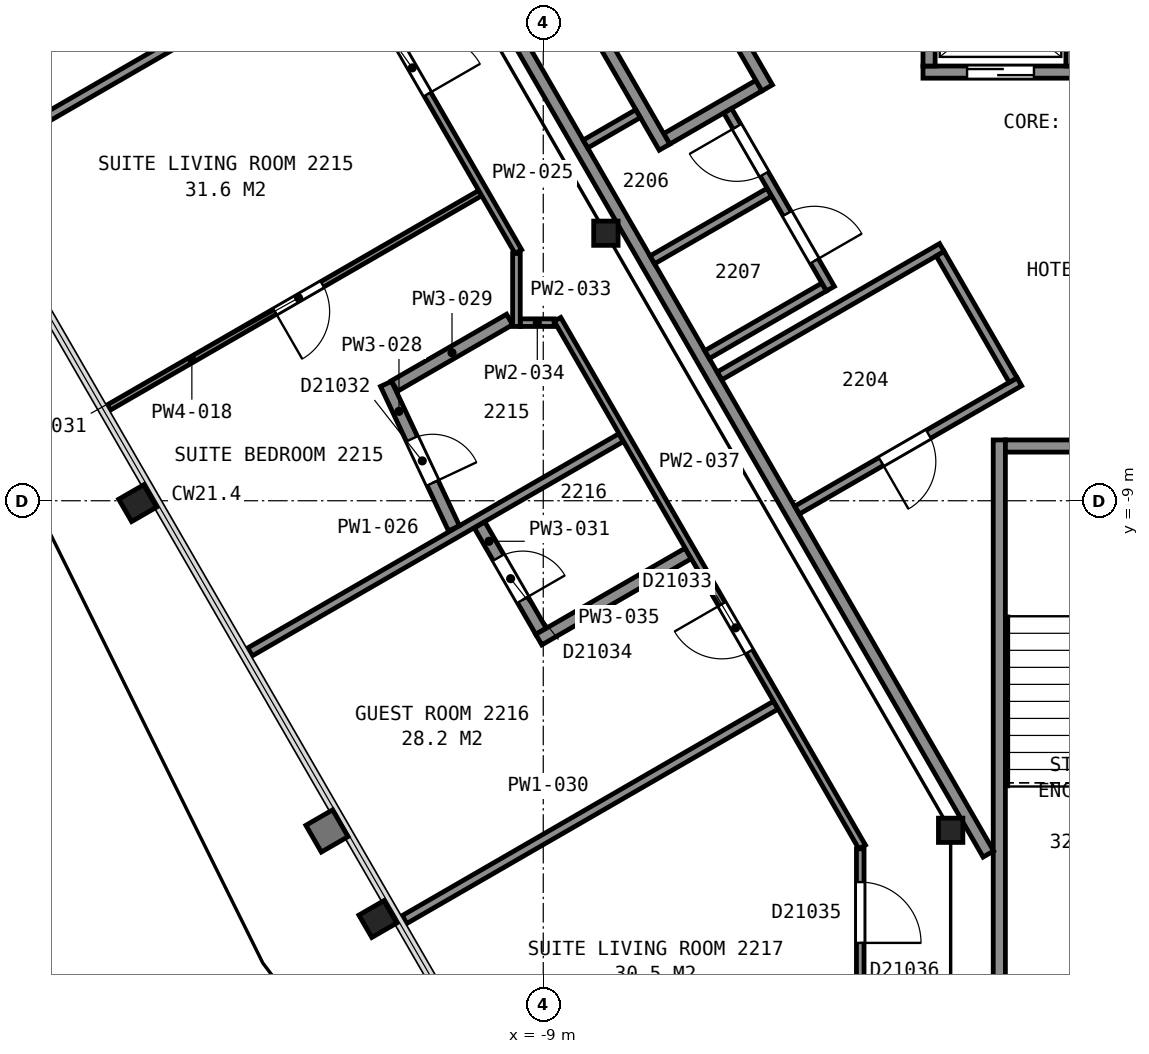
"""IFC4 building model, lengths in metres.
Left out: names, types, materials, properties, quantities, classifications, styles, units other than length and angle.
Written with IfcOpenShell. Run it as: python <this file> out.ifc"""

import sys

from ifc_helpers import new_model, si_unit, direction, frame, frame_2d, origin, origin_2d, place, context, subcontext, project, spatial, rectangle, i_section, extrude, element, fill, save


model = new_model("IFC4")
c1 = context("Model", 3, precision=1e-05, world=origin(), true_north=direction((0.0, 1.0)))
c2 = subcontext(c1, "Body", "Model", "MODEL_VIEW")
j1 = project(units=[si_unit("LENGTHUNIT", "METRE"), si_unit("PLANEANGLEUNIT", "RADIAN")], contexts=[c1])
p1 = place(None, origin())
s1 = spatial("IfcSite", under=j1, at=p1, CompositionType="ELEMENT")
p2 = place(p1, origin())
s2 = spatial("IfcBuilding", under=s1, at=p2, CompositionType="ELEMENT")
p3 = place(p2, frame((0.0, 0.0, 96.4)))
s3 = spatial("IfcBuildingStorey", under=s2, at=p3, CompositionType="ELEMENT", Elevation=96.4)
p4 = place(p3, frame((-15.67, -9.04, 0.0), z_axis=(0.0, 0.0, 1.0), x_axis=(-0.5, 0.866025403784, 0.0)))
e1 = element("IfcColumn", 1, at=p4, inside=s3, PredefinedType="COLUMN", context=c2, shape_type="SweptSolid", body=[
    extrude(i_section(OverallWidth=0.424, OverallDepth=0.475, WebThickness=0.048, FlangeThickness=0.077, FilletRadius=0.015, at=origin_2d()), origin(), (0.0, 0.0, 1.0), 3.565),
])
p5 = place(p3, frame((-11.72, -15.88, 0.0), z_axis=(0.0, 0.0, 1.0), x_axis=(-0.5, 0.866025403784, 0.0)))
e2 = element("IfcColumn", 2, at=p5, inside=s3, PredefinedType="COLUMN", context=c2, shape_type="SweptSolid", body=[
    extrude(i_section(OverallWidth=0.424, OverallDepth=0.475, WebThickness=0.048, FlangeThickness=0.077, FilletRadius=0.015, at=origin_2d()), origin(), (0.0, 0.0, 1.0), 3.56),
])
for number, where, z_axis, x_axis in (
    (3, (-7.97, -4.6, 0.0), (0.0, 0.0, 1.0), (1.0, 0.0, 0.0)),
    (4, (-2.3, -14.42, 0.0), (0.0, 0.0, 1.0), (1.0, 0.0, 0.0)),
):
    element("IfcColumn", number, at=place(p3, frame(where, z_axis=z_axis, x_axis=x_axis)), inside=s3, PredefinedType="COLUMN", context=c2, shape_type="SweptSolid", body=[
        extrude(i_section(OverallWidth=0.401, OverallDepth=0.399, WebThickness=0.025, FlangeThickness=0.04, FilletRadius=0.015, at=origin_2d()), origin(), (0.0, 0.0, 1.0), 3.6),
    ])
p6 = place(p3, frame((-1.5, -8.0, 0.0), z_axis=(0.0, 0.0, 1.0), x_axis=(0.0, -1.0, 0.0)))
e5 = element("IfcWall", 5, at=p6, inside=s3, PredefinedType="PARTITIONING", context=c2, shape_type="SweptSolid", body=[
    extrude(rectangle(XDim=12.0, YDim=0.2, at=frame_2d((6.0, 0.0))), origin(), (0.0, 0.0, 1.0), 3.35),
])
p7 = place(p3, frame((-1.4, -8.1, 0.0), z_axis=(0.0, 0.0, 1.0), x_axis=(1.0, 0.0, 0.0)))
e6 = element("IfcWall", 6, at=p7, inside=s3, PredefinedType="PARTITIONING", context=c2, shape_type="SweptSolid", body=[
    extrude(rectangle(XDim=2.8, YDim=0.2, at=frame_2d((1.4, 0.0))), origin(), (0.0, 0.0, 1.0), 3.35),
])
p8 = place(p3, frame((-2.755, -1.95, 0.0), z_axis=(0.0, 0.0, 1.0), x_axis=(1.0, 0.0, 0.0)))
e7 = element("IfcWall", 7, at=p8, inside=s3, PredefinedType="PARTITIONING", context=c2, shape_type="SweptSolid", body=[
    extrude(rectangle(XDim=2.55, YDim=0.2, at=frame_2d((1.275, 0.0))), origin(), (0.0, 0.0, 1.0), 3.6),
])
p9 = place(p8, frame((0.725, 0.0, 0.0)))
e8 = element("IfcOpeningElement", 8, at=p9, cuts=e7, PredefinedType="OPENING", context=c2, shape_type="SweptSolid", body=[
    extrude(rectangle(XDim=1.1, YDim=2.1, at=frame_2d((0.55, 1.05))), frame((0.0, 0.11, 0.0), z_axis=(0.0, -1.0, 0.0), x_axis=(1.0, 0.0, 0.0)), (0.0, 0.0, 1.0), 0.22),
])
for number, where, z_axis, x_axis in (
    (9, (-6.97, -3.048, 0.0), (0.0, 0.0, 1.0), (0.866, 0.5, 0.0)),
    (10, (-0.305, -1.85, 0.0), (0.0, 0.0, 1.0), (0.0, 1.0, 0.0)),
    (11, (-2.655, -1.85, 0.0), (0.0, 0.0, 1.0), (0.0, 1.0, 0.0)),
):
    element("IfcWall", number, at=place(p3, frame(where, z_axis=z_axis, x_axis=x_axis)), inside=s3, PredefinedType="PARTITIONING", context=c2, shape_type="SweptSolid", body=[
        extrude(rectangle(XDim=1.75, YDim=0.2, at=frame_2d((0.875, 0.0))), origin(), (0.0, 0.0, 1.0), 3.6),
    ])
p10 = place(p3, frame((-5.318, -2.21, 0.0), z_axis=(0.0, 0.0, 1.0), x_axis=(-0.499938297808, 0.866061024631, 0.0)))
e12 = element("IfcWall", 12, at=p10, inside=s3, PredefinedType="PARTITIONING", context=c2, shape_type="SweptSolid", body=[
    extrude(rectangle(XDim=2.35, YDim=0.2, at=frame_2d((1.175, 0.0))), origin(), (0.0, 0.0, 1.0), 3.6),
])
p11 = place(p3, frame((-7.006, -3.185, 0.0), z_axis=(0.0, 0.0, 1.0), x_axis=(-0.499990435942, 0.866030925526, 0.0)))
e13 = element("IfcWall", 13, at=p11, inside=s3, PredefinedType="PARTITIONING", context=c2, shape_type="SweptSolid", body=[
    extrude(rectangle(XDim=2.55, YDim=0.2, at=frame_2d((1.275, 0.0))), origin(), (0.0, 0.0, 1.0), 3.6),
])
p12 = place(p3, frame((-13.664, 5.946, 0.0), z_axis=(0.0, 0.0, 1.0), x_axis=(0.499994327219, -0.866028678941, 0.0)))
e14 = element("IfcWall", 14, at=p12, inside=s3, PredefinedType="PARTITIONING", context=c2, shape_type="SweptSolid", body=[
    extrude(rectangle(XDim=23.968, YDim=0.2, at=frame_2d((11.984, 0.0))), origin(), (0.0, 0.0, 1.0), 3.35),
])
p13 = place(p3, frame((-8.306, -3.133, 0.0), z_axis=(0.0, 0.0, 1.0), x_axis=(0.86606747808, 0.499927118101, 0.0)))
e15 = element("IfcWall", 15, at=p13, inside=s3, PredefinedType="PARTITIONING", context=c2, shape_type="SweptSolid", body=[
    extrude(rectangle(XDim=0.998, YDim=0.15, at=frame_2d((0.499, 0.0))), origin(), (0.0, 0.0, 1.0), 3.35),
])
p14 = place(p3, frame((-7.206, -5.038, 0.0), z_axis=(0.0, 0.0, 1.0), x_axis=(0.865944298464, 0.500140452231, 0.0)))
e16 = element("IfcWall", 16, at=p14, inside=s3, PredefinedType="PARTITIONING", context=c2, shape_type="SweptSolid", body=[
    extrude(rectangle(XDim=2.224, YDim=0.15, at=frame_2d((1.112, 0.0))), origin(), (0.0, 0.0, 1.0), 3.35),
])
p15 = place(p3, frame((-6.306, -6.597, 0.0), z_axis=(0.0, 0.0, 1.0), x_axis=(0.866019272134, 0.50001062018, 0.0)))
e17 = element("IfcWall", 17, at=p15, inside=s3, PredefinedType="PARTITIONING", context=c2, shape_type="SweptSolid", body=[
    extrude(rectangle(XDim=2.225, YDim=0.15, at=frame_2d((1.112, 0.0))), origin(), (0.0, 0.0, 1.0), 3.35),
])
p16 = place(p3, frame((-6.1, -6.946, 0.0), z_axis=(0.0, 0.0, 1.0), x_axis=(0.866038200431, 0.499977834903, 0.0)))
e18 = element("IfcWall", 18, at=p16, inside=s3, PredefinedType="PARTITIONING", context=c2, shape_type="SweptSolid", body=[
    extrude(rectangle(XDim=4.22, YDim=0.15, at=frame_2d((2.11, 0.0))), origin(), (0.0, 0.0, 1.0), 3.35),
])
p17 = place(p3, frame((-4.278, -5.512, 0.0), z_axis=(0.0, 0.0, 1.0), x_axis=(-0.499933120428, 0.86606401328, 0.0)))
e19 = element("IfcWall", 19, at=p17, inside=s3, PredefinedType="PARTITIONING", context=c2, shape_type="SweptSolid", body=[
    extrude(rectangle(XDim=3.377, YDim=0.15, at=frame_2d((1.689, 0.0))), origin(), (0.0, 0.0, 1.0), 3.35),
])
p18 = place(p17, frame((2.177, 0.0, 0.0)))
e20 = element("IfcOpeningElement", 20, at=p18, cuts=e19, PredefinedType="OPENING", context=c2, shape_type="SweptSolid", body=[
    extrude(rectangle(XDim=0.9, YDim=2.1, at=frame_2d((0.45, 1.05))), frame((0.0, 0.085, 0.0), z_axis=(0.0, -1.0, 0.0), x_axis=(1.0, 0.0, 0.0)), (0.0, 0.0, 1.0), 0.17),
])
p19 = place(p17, frame((0.525, 0.0, 0.0)))
e21 = element("IfcOpeningElement", 21, at=p19, cuts=e19, PredefinedType="OPENING", context=c2, shape_type="SweptSolid", body=[
    extrude(rectangle(XDim=0.9, YDim=2.1, at=frame_2d((0.45, 1.05))), frame((0.0, 0.085, 0.0), z_axis=(0.0, -1.0, 0.0), x_axis=(1.0, 0.0, 0.0)), (0.0, 0.0, 1.0), 0.17),
])
p20 = place(p3, frame((-4.825, -9.154, 0.0), z_axis=(0.0, 0.0, 1.0), x_axis=(0.866023738697, 0.500002884005, 0.0)))
e22 = element("IfcWall", 22, at=p20, inside=s3, PredefinedType="PARTITIONING", context=c2, shape_type="SweptSolid", body=[
    extrude(rectangle(XDim=4.22, YDim=0.15, at=frame_2d((2.11, 0.0))), origin(), (0.0, 0.0, 1.0), 3.35),
])
p21 = place(p20, frame((1.595, 0.0, 0.0)))
e23 = element("IfcOpeningElement", 23, at=p21, cuts=e22, PredefinedType="OPENING", context=c2, shape_type="SweptSolid", body=[
    extrude(rectangle(XDim=0.9, YDim=2.1, at=frame_2d((0.45, 1.05))), frame((0.0, 0.085, 0.0), z_axis=(0.0, -1.0, 0.0), x_axis=(1.0, 0.0, 0.0)), (0.0, 0.0, 1.0), 0.17),
])
p22 = place(p3, frame((-2.472, -4.938, 0.0), z_axis=(0.0, 0.0, 1.0), x_axis=(0.500045362686, -0.865999212041, 0.0)))
e24 = element("IfcWall", 24, at=p22, inside=s3, PredefinedType="PARTITIONING", context=c2, shape_type="SweptSolid", body=[
    extrude(rectangle(XDim=2.4, YDim=0.15, at=frame_2d((1.2, 0.0))), origin(), (0.0, 0.0, 1.0), 3.35),
])
p23 = place(p3, frame((-18.466, -3.445, 0.0), z_axis=(0.0, 0.0, 1.0), x_axis=(0.86605175433, 0.499954356739, 0.0)))
e25 = element("IfcWall", 25, at=p23, inside=s3, PredefinedType="PARTITIONING", context=c2, shape_type="SweptSolid", body=[
    extrude(rectangle(XDim=7.048, YDim=0.15, at=frame_2d((3.524, 0.0))), origin(), (0.0, 0.0, 1.0), 2.613),
])
p24 = place(p3, frame((-10.037, -3.94, 0.0), z_axis=(0.0, 0.0, 1.0), x_axis=(-0.866063951978, -0.499933226626, 0.0)))
e26 = element("IfcWall", 26, at=p24, inside=s3, PredefinedType="PARTITIONING", context=c2, shape_type="SweptSolid", body=[
    extrude(rectangle(XDim=7.052, YDim=0.1, at=frame_2d((3.526, 0.0))), origin(), (0.0, 0.0, 1.0), 2.613),
])
p25 = place(p24, frame((2.998, 0.0, 0.0)))
e27 = element("IfcOpeningElement", 27, at=p25, cuts=e26, PredefinedType="OPENING", context=c2, shape_type="SweptSolid", body=[
    extrude(rectangle(XDim=0.9, YDim=2.1, at=frame_2d((0.45, 1.05))), frame((0.0, 0.06, 0.0), z_axis=(0.0, -1.0, 0.0), x_axis=(1.0, 0.0, 0.0)), (0.0, 0.0, 1.0), 0.12),
])
p26 = place(p3, frame((-9.41, -4.902, 0.0), z_axis=(0.0, 0.0, 1.0), x_axis=(-0.499971244726, 0.866042005013, 0.0)))
e28 = element("IfcWall", 28, at=p26, inside=s3, PredefinedType="PARTITIONING", context=c2, shape_type="SweptSolid", body=[
    extrude(rectangle(XDim=10.052, YDim=0.125, at=frame_2d((5.026, 0.0))), origin(), (0.0, 0.0, 1.0), 2.613),
])
p27 = place(p26, frame((6.608, 0.0, 0.0)))
e29 = element("IfcOpeningElement", 29, at=p27, cuts=e28, PredefinedType="OPENING", context=c2, shape_type="SweptSolid", body=[
    extrude(rectangle(XDim=1.0, YDim=2.1, at=frame_2d((0.5, 1.05))), frame((0.0, 0.073, 0.0), z_axis=(0.0, -1.0, 0.0), x_axis=(1.0, 0.0, 0.0)), (0.0, 0.0, 1.0), 0.145),
])
p28 = place(p26, frame((2.989, 0.0, 0.0)))
e30 = element("IfcOpeningElement", 30, at=p28, cuts=e28, PredefinedType="OPENING", context=c2, shape_type="SweptSolid", body=[
    extrude(rectangle(XDim=1.0, YDim=2.1, at=frame_2d((0.5, 1.05))), frame((0.0, 0.073, 0.0), z_axis=(0.0, -1.0, 0.0), x_axis=(1.0, 0.0, 0.0)), (0.0, 0.0, 1.0), 0.145),
])
p29 = place(p3, frame((-13.823, -11.487, 0.0), z_axis=(0.0, 0.0, 1.0), x_axis=(0.865980767462, 0.500077304409, 0.0)))
e31 = element("IfcWall", 31, at=p29, inside=s3, PredefinedType="PARTITIONING", context=c2, shape_type="SweptSolid", body=[
    extrude(rectangle(XDim=7.047, YDim=0.15, at=frame_2d((3.524, 0.0))), origin(), (0.0, 0.0, 1.0), 2.613),
])
p30 = place(p3, frame((-11.585, -7.077, 0.0), z_axis=(0.0, 0.0, 1.0), x_axis=(0.425434257814, -0.904989332688, 0.0)))
e32 = element("IfcWall", 32, at=p30, inside=s3, PredefinedType="PARTITIONING", context=c2, shape_type="SweptSolid", body=[
    extrude(rectangle(XDim=2.625, YDim=0.2, at=frame_2d((1.313, 0.0))), origin(), (0.0, 0.0, 1.0), 2.613),
])
p31 = place(p30, frame((1.0, 0.0, 0.0)))
e33 = element("IfcOpeningElement", 33, at=p31, cuts=e32, PredefinedType="OPENING", context=c2, shape_type="SweptSolid", body=[
    extrude(rectangle(XDim=0.8, YDim=2.1, at=frame_2d((0.4, 1.05))), frame((0.0, 0.11, 0.0), z_axis=(0.0, -1.0, 0.0), x_axis=(1.0, 0.0, 0.0)), (0.0, 0.0, 1.0), 0.22),
])
p32 = place(p3, frame((-11.448, -7.113, 0.0), z_axis=(0.0, 0.0, 1.0), x_axis=(0.865960673566, 0.500112099272, 0.0)))
e34 = element("IfcWall", 34, at=p32, inside=s3, PredefinedType="PARTITIONING", context=c2, shape_type="SweptSolid", body=[
    extrude(rectangle(XDim=2.188, YDim=0.2, at=frame_2d((1.094, 0.0))), origin(), (0.0, 0.0, 1.0), 2.613),
])
p33 = place(p3, frame((-11.282, -15.888, 0.0), z_axis=(0.0, 0.0, 1.0), x_axis=(0.866031654768, 0.499989172823, 0.0)))
e35 = element("IfcWall", 35, at=p33, inside=s3, PredefinedType="PARTITIONING", context=c2, shape_type="SweptSolid", body=[
    extrude(rectangle(XDim=7.052, YDim=0.15, at=frame_2d((3.526, 0.0))), origin(), (0.0, 0.0, 1.0), 2.613),
])
p34 = place(p3, frame((-10.047, -9.398, 0.0), z_axis=(0.0, 0.0, 1.0), x_axis=(0.499935208997, -0.866062807656, 0.0)))
e36 = element("IfcWall", 36, at=p34, inside=s3, PredefinedType="PARTITIONING", context=c2, shape_type="SweptSolid", body=[
    extrude(rectangle(XDim=2.02, YDim=0.2, at=frame_2d((1.01, 0.0))), origin(), (0.0, 0.0, 1.0), 2.613),
])
p35 = place(p34, frame((0.62, 0.0, 0.0)))
e37 = element("IfcOpeningElement", 37, at=p35, cuts=e36, PredefinedType="OPENING", context=c2, shape_type="SweptSolid", body=[
    extrude(rectangle(XDim=0.8, YDim=2.1, at=frame_2d((0.4, 1.05))), frame((0.0, 0.11, 0.0), z_axis=(0.0, -1.0, 0.0), x_axis=(1.0, 0.0, 0.0)), (0.0, 0.0, 1.0), 0.22),
])
p36 = place(p3, frame((-9.441, -6.134, 0.0), z_axis=(0.0, 0.0, 1.0), x_axis=(0.0, 1.0, 0.0)))
e38 = element("IfcWall", 38, at=p36, inside=s3, PredefinedType="PARTITIONING", context=c2, shape_type="SweptSolid", body=[
    extrude(rectangle(XDim=1.2, YDim=0.125, at=frame_2d((0.6, 0.0))), origin(), (0.0, 0.0, 1.0), 2.613),
])
p37 = place(p3, frame((-9.376, -6.071, 0.0), z_axis=(0.0, 0.0, 1.0), x_axis=(1.0, 0.0, 0.0)))
e39 = element("IfcWall", 39, at=p37, inside=s3, PredefinedType="PARTITIONING", context=c2, shape_type="SweptSolid", body=[
    extrude(rectangle(XDim=0.556, YDim=0.125, at=frame_2d((0.278, 0.0))), origin(), (0.0, 0.0, 1.0), 2.613),
])
p38 = place(p3, frame((-9.074, -11.284, 0.0), z_axis=(0.0, 0.0, 1.0), x_axis=(0.866197046655, 0.499702587912, 0.0)))
e40 = element("IfcWall", 40, at=p38, inside=s3, PredefinedType="PARTITIONING", context=c2, shape_type="SweptSolid", body=[
    extrude(rectangle(XDim=2.837, YDim=0.2, at=frame_2d((1.418, 0.0))), origin(), (0.0, 0.0, 1.0), 2.613),
])
p39 = place(p3, frame((-3.756, -14.694, 0.0), z_axis=(0.0, 0.0, 1.0), x_axis=(-0.500051472265, 0.865995684219, 0.0)))
e41 = element("IfcWall", 41, at=p39, inside=s3, PredefinedType="PARTITIONING", context=c2, shape_type="SweptSolid", body=[
    extrude(rectangle(XDim=10.02, YDim=0.125, at=frame_2d((5.01, 0.0))), origin(), (0.0, 0.0, 1.0), 2.613),
])
p40 = place(p39, frame((3.711, 0.0, 0.0)))
e42 = element("IfcOpeningElement", 42, at=p40, cuts=e41, PredefinedType="OPENING", context=c2, shape_type="SweptSolid", body=[
    extrude(rectangle(XDim=0.9, YDim=2.1, at=frame_2d((0.45, 1.05))), frame((0.0, 0.073, 0.0), z_axis=(0.0, -1.0, 0.0), x_axis=(1.0, 0.0, 0.0)), (0.0, 0.0, 1.0), 0.145),
])
p41 = place(p3, frame((-3.787, -22.85, 0.0), z_axis=(0.0, 0.0, 1.0), x_axis=(0.0, 1.0, 0.0)))
e43 = element("IfcWall", 43, at=p41, inside=s3, PredefinedType="PARTITIONING", context=c2, shape_type="SweptSolid", body=[
    extrude(rectangle(XDim=8.125, YDim=0.125, at=frame_2d((4.062, 0.0))), origin(), (0.0, 0.0, 1.0), 2.613),
])
p42 = place(p41, frame((6.577, 0.0, 0.0)))
e44 = element("IfcOpeningElement", 44, at=p42, cuts=e43, PredefinedType="OPENING", context=c2, shape_type="SweptSolid", body=[
    extrude(rectangle(XDim=1.0, YDim=2.1, at=frame_2d((0.5, 1.05))), frame((0.0, 0.073, 0.0), z_axis=(0.0, -1.0, 0.0), x_axis=(1.0, 0.0, 0.0)), (0.0, 0.0, 1.0), 0.145),
])
p43 = place(p9, origin())
e45 = element("IfcDoor", 45, at=p43, inside=s3, OperationType="SLIDING_TO_RIGHT", PredefinedType="DOOR", context=c2, shape_type="SweptSolid", body=[
    extrude(rectangle(XDim=1.1, YDim=2.1, at=frame_2d((0.55, 1.05))), frame((0.0, 0.025, 0.0), z_axis=(0.0, -1.0, 0.0), x_axis=(1.0, 0.0, 0.0)), (0.0, 0.0, 1.0), 0.05),
])
fill(e8, e45)
p44 = place(p18, origin())
e46 = element("IfcDoor", 46, at=p44, inside=s3, OperationType="SINGLE_SWING_RIGHT", PredefinedType="DOOR", context=c2, shape_type="SweptSolid", body=[
    extrude(rectangle(XDim=0.9, YDim=2.1, at=frame_2d((0.45, 1.05))), frame((0.0, 0.025, 0.0), z_axis=(0.0, -1.0, 0.0), x_axis=(1.0, 0.0, 0.0)), (0.0, 0.0, 1.0), 0.05),
])
fill(e20, e46)
p45 = place(p19, origin())
e47 = element("IfcDoor", 47, at=p45, inside=s3, OperationType="SINGLE_SWING_LEFT", PredefinedType="DOOR", context=c2, shape_type="SweptSolid", body=[
    extrude(rectangle(XDim=0.9, YDim=2.1, at=frame_2d((0.45, 1.05))), frame((0.0, 0.025, 0.0), z_axis=(0.0, -1.0, 0.0), x_axis=(1.0, 0.0, 0.0)), (0.0, 0.0, 1.0), 0.05),
])
fill(e21, e47)
p46 = place(p21, origin())
e48 = element("IfcDoor", 48, at=p46, inside=s3, OperationType="SINGLE_SWING_LEFT", PredefinedType="DOOR", context=c2, shape_type="SweptSolid", body=[
    extrude(rectangle(XDim=0.9, YDim=2.1, at=frame_2d((0.45, 1.05))), frame((0.0, 0.025, 0.0), z_axis=(0.0, -1.0, 0.0), x_axis=(1.0, 0.0, 0.0)), (0.0, 0.0, 1.0), 0.05),
])
fill(e23, e48)
p47 = place(p25, origin())
e49 = element("IfcDoor", 49, at=p47, inside=s3, OperationType="SINGLE_SWING_RIGHT", PredefinedType="DOOR", context=c2, shape_type="SweptSolid", body=[
    extrude(rectangle(XDim=0.9, YDim=2.1, at=frame_2d((0.45, 1.05))), frame((0.0, 0.025, 0.0), z_axis=(0.0, -1.0, 0.0), x_axis=(1.0, 0.0, 0.0)), (0.0, 0.0, 1.0), 0.05),
])
fill(e27, e49)
p48 = place(p28, origin())
e50 = element("IfcDoor", 50, at=p48, inside=s3, OperationType="SINGLE_SWING_LEFT", PredefinedType="DOOR", context=c2, shape_type="SweptSolid", body=[
    extrude(rectangle(XDim=1.0, YDim=2.1, at=frame_2d((0.5, 1.05))), frame((0.0, 0.025, 0.0), z_axis=(0.0, -1.0, 0.0), x_axis=(1.0, 0.0, 0.0)), (0.0, 0.0, 1.0), 0.05),
])
fill(e30, e50)
p49 = place(p31, origin())
e51 = element("IfcDoor", 51, at=p49, inside=s3, OperationType="SINGLE_SWING_RIGHT", PredefinedType="DOOR", context=c2, shape_type="SweptSolid", body=[
    extrude(rectangle(XDim=0.8, YDim=2.1, at=frame_2d((0.4, 1.05))), frame((0.0, 0.025, 0.0), z_axis=(0.0, -1.0, 0.0), x_axis=(1.0, 0.0, 0.0)), (0.0, 0.0, 1.0), 0.05),
])
fill(e33, e51)
p50 = place(p35, origin())
e52 = element("IfcDoor", 52, at=p50, inside=s3, OperationType="SINGLE_SWING_RIGHT", PredefinedType="DOOR", context=c2, shape_type="SweptSolid", body=[
    extrude(rectangle(XDim=0.8, YDim=2.1, at=frame_2d((0.4, 1.05))), frame((0.0, 0.025, 0.0), z_axis=(0.0, -1.0, 0.0), x_axis=(1.0, 0.0, 0.0)), (0.0, 0.0, 1.0), 0.05),
])
fill(e37, e52)
p51 = place(p40, origin())
e53 = element("IfcDoor", 53, at=p51, inside=s3, OperationType="SINGLE_SWING_RIGHT", PredefinedType="DOOR", context=c2, shape_type="SweptSolid", body=[
    extrude(rectangle(XDim=0.9, YDim=2.1, at=frame_2d((0.45, 1.05))), frame((0.0, 0.025, 0.0), z_axis=(0.0, -1.0, 0.0), x_axis=(1.0, 0.0, 0.0)), (0.0, 0.0, 1.0), 0.05),
])
fill(e42, e53)
p52 = place(p42, origin())
e54 = element("IfcDoor", 54, at=p52, inside=s3, OperationType="SINGLE_SWING_LEFT", PredefinedType="DOOR", context=c2, shape_type="SweptSolid", body=[
    extrude(rectangle(XDim=1.0, YDim=2.1, at=frame_2d((0.5, 1.05))), frame((0.0, 0.025, 0.0), z_axis=(0.0, -1.0, 0.0), x_axis=(1.0, 0.0, 0.0)), (0.0, 0.0, 1.0), 0.05),
])
fill(e44, e54)
save(model, sys.argv[1])
